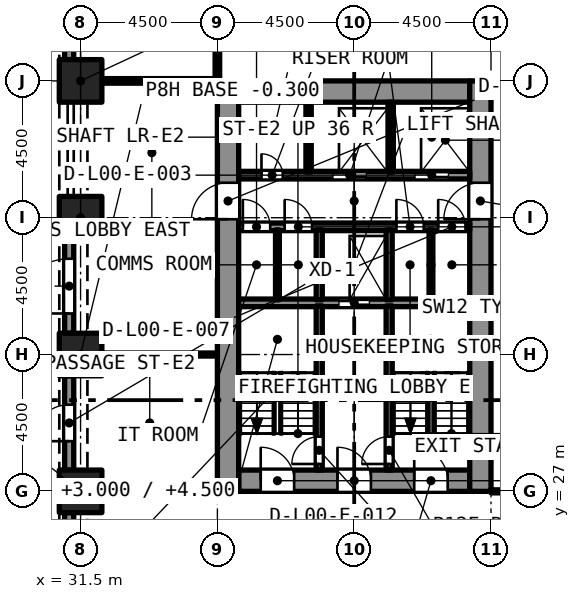
"""IFC4 building model, lengths in metres.
Left out: names, types, materials, properties, quantities, classifications, styles, units other than length and angle.
Written with IfcOpenShell. Run it as: python <this file> out.ifc"""

import sys

from ifc_helpers import new_model, si_unit, direction, frame, frame_2d, origin, origin_2d, place, context, subcontext, project, spatial, rectangle, extrude, element, fill, save


model = new_model("IFC4")
c1 = context("Model", 3, precision=1e-05, world=origin(), true_north=direction((0.0, 1.0)))
c2 = subcontext(c1, "Body", "Model", "MODEL_VIEW")
j1 = project(units=[si_unit("LENGTHUNIT", "METRE"), si_unit("PLANEANGLEUNIT", "RADIAN")], contexts=[c1])
p1 = place(None, origin())
s1 = spatial("IfcSite", under=j1, at=p1, CompositionType="ELEMENT")
p2 = place(p1, origin())
s2 = spatial("IfcBuilding", under=s1, at=p2, CompositionType="ELEMENT")
p3 = place(p2, origin())
s3 = spatial("IfcBuildingStorey", under=s2, at=p3, CompositionType="ELEMENT", Elevation=0.0)
for number, where, z_axis, x_axis in (
    (1, (31.5, 27.0, -0.3), (0.0, 0.0, 1.0), (1.0, 0.0, 0.0)),
    (2, (31.5, 31.5, -0.3), (0.0, 0.0, 1.0), (1.0, 0.0, 0.0)),
    (3, (31.5, 36.0, -0.3), (0.0, 0.0, 1.0), (1.0, 0.0, 0.0)),
    (4, (31.5, 40.5, -0.3), (0.0, 0.0, 1.0), (1.0, 0.0, 0.0)),
):
    element("IfcColumn", number, at=place(p3, frame(where, z_axis=z_axis, x_axis=x_axis)), inside=s3, PredefinedType="COLUMN", context=c2, shape_type="SweptSolid", body=[
        extrude(rectangle(XDim=1.4, YDim=1.4, at=origin_2d()), origin(), (0.0, 0.0, 1.0), 6.3),
    ])
p4 = place(p3, frame((36.7, 27.35, -0.3), z_axis=(0.0, 0.0, 1.0), x_axis=(1.0, 0.0, 0.0)))
e5 = element("IfcWall", 5, at=p4, inside=s3, PredefinedType="SOLIDWALL", context=c2, shape_type="SweptSolid", body=[
    extrude(rectangle(XDim=7.6, YDim=0.7, at=frame_2d((3.8, 0.0))), origin(), (0.0, 0.0, 1.0), 6.3),
])
p5 = place(p4, frame((5.775, 0.0, 0.3)))
e6 = element("IfcOpeningElement", 6, at=p5, cuts=e5, PredefinedType="OPENING", context=c2, shape_type="SweptSolid", body=[
    extrude(rectangle(XDim=1.1, YDim=2.1, at=frame_2d((0.55, 1.05))), frame((0.0, 0.36, 0.0), z_axis=(0.0, -1.0, 0.0), x_axis=(1.0, 0.0, 0.0)), (0.0, 0.0, 1.0), 0.72),
])
p6 = place(p4, frame((3.25, 0.0, 0.3)))
e7 = element("IfcOpeningElement", 7, at=p6, cuts=e5, PredefinedType="OPENING", context=c2, shape_type="SweptSolid", body=[
    extrude(rectangle(XDim=1.1, YDim=2.1, at=frame_2d((0.55, 1.05))), frame((0.0, 0.36, 0.0), z_axis=(0.0, -1.0, 0.0), x_axis=(1.0, 0.0, 0.0)), (0.0, 0.0, 1.0), 0.72),
])
p7 = place(p4, frame((0.725, 0.0, 0.3)))
e8 = element("IfcOpeningElement", 8, at=p7, cuts=e5, PredefinedType="OPENING", context=c2, shape_type="SweptSolid", body=[
    extrude(rectangle(XDim=1.1, YDim=2.1, at=frame_2d((0.55, 1.05))), frame((0.0, 0.36, 0.0), z_axis=(0.0, -1.0, 0.0), x_axis=(1.0, 0.0, 0.0)), (0.0, 0.0, 1.0), 0.72),
])
p8 = place(p3, frame((36.7, 40.15, -0.3), z_axis=(0.0, 0.0, 1.0), x_axis=(1.0, 0.0, 0.0)))
e9 = element("IfcWall", 9, at=p8, inside=s3, PredefinedType="SOLIDWALL", context=c2, shape_type="SweptSolid", body=[
    extrude(rectangle(XDim=7.6, YDim=0.7, at=frame_2d((3.8, 0.0))), origin(), (0.0, 0.0, 1.0), 6.3),
])
p9 = place(p3, frame((36.35, 27.0, -0.3), z_axis=(0.0, 0.0, 1.0), x_axis=(0.0, 1.0, 0.0)))
e10 = element("IfcWall", 10, at=p9, inside=s3, PredefinedType="SOLIDWALL", context=c2, shape_type="SweptSolid", body=[
    extrude(rectangle(XDim=13.5, YDim=0.7, at=frame_2d((6.75, 0.0))), origin(), (0.0, 0.0, 1.0), 6.3),
])
p10 = place(p9, frame((8.95, 0.0, 0.3)))
e11 = element("IfcOpeningElement", 11, at=p10, cuts=e10, PredefinedType="OPENING", context=c2, shape_type="SweptSolid", body=[
    extrude(rectangle(XDim=1.2, YDim=2.1, at=frame_2d((0.6, 1.05))), frame((0.0, 0.36, 0.0), z_axis=(0.0, -1.0, 0.0), x_axis=(1.0, 0.0, 0.0)), (0.0, 0.0, 1.0), 0.72),
])
p11 = place(p3, frame((44.65, 27.0, -0.3), z_axis=(0.0, 0.0, 1.0), x_axis=(0.0, 1.0, 0.0)))
e12 = element("IfcWall", 12, at=p11, inside=s3, PredefinedType="SOLIDWALL", context=c2, shape_type="SweptSolid", body=[
    extrude(rectangle(XDim=13.5, YDim=0.7, at=frame_2d((6.75, 0.0))), origin(), (0.0, 0.0, 1.0), 6.3),
])
p12 = place(p11, frame((8.95, 0.0, 0.3)))
e13 = element("IfcOpeningElement", 13, at=p12, cuts=e12, PredefinedType="OPENING", context=c2, shape_type="SweptSolid", body=[
    extrude(rectangle(XDim=1.2, YDim=2.1, at=frame_2d((0.6, 1.05))), frame((0.0, 0.36, 0.0), z_axis=(0.0, -1.0, 0.0), x_axis=(1.0, 0.0, 0.0)), (0.0, 0.0, 1.0), 0.72),
])
p13 = place(p3, frame((31.125, 41.2, 0.0), z_axis=(0.0, 0.0, 1.0), x_axis=(0.0, 1.0, 0.0)))
e14 = element("IfcWall", 14, at=p13, inside=s3, PredefinedType="SOLIDWALL", context=c2, shape_type="SweptSolid", body=[
    extrude(rectangle(XDim=3.1, YDim=0.3, at=frame_2d((1.55, 0.0))), origin(), (0.0, 0.0, 1.0), 6.0),
])
p14 = place(p13, frame((0.65, 0.0, 0.0)))
e15 = element("IfcOpeningElement", 15, at=p14, cuts=e14, PredefinedType="OPENING", context=c2, shape_type="SweptSolid", body=[
    extrude(rectangle(XDim=1.8, YDim=2.4, at=frame_2d((0.9, 1.2))), frame((0.0, 0.16, 0.0), z_axis=(0.0, -1.0, 0.0), x_axis=(1.0, 0.0, 0.0)), (0.0, 0.0, 1.0), 0.32),
])
p15 = place(p3, frame((31.125, 32.2, 0.0), z_axis=(0.0, 0.0, 1.0), x_axis=(0.0, 1.0, 0.0)))
e16 = element("IfcWall", 16, at=p15, inside=s3, PredefinedType="SOLIDWALL", context=c2, shape_type="SweptSolid", body=[
    extrude(rectangle(XDim=3.1, YDim=0.3, at=frame_2d((1.55, 0.0))), origin(), (0.0, 0.0, 1.0), 6.0),
])
p16 = place(p15, frame((0.65, 0.0, 0.0)))
e17 = element("IfcOpeningElement", 17, at=p16, cuts=e16, PredefinedType="OPENING", context=c2, shape_type="SweptSolid", body=[
    extrude(rectangle(XDim=1.8, YDim=2.4, at=frame_2d((0.9, 1.2))), frame((0.0, 0.16, 0.0), z_axis=(0.0, -1.0, 0.0), x_axis=(1.0, 0.0, 0.0)), (0.0, 0.0, 1.0), 0.32),
])
p17 = place(p3, frame((31.125, 27.7, 0.0), z_axis=(0.0, 0.0, 1.0), x_axis=(0.0, 1.0, 0.0)))
e18 = element("IfcWall", 18, at=p17, inside=s3, PredefinedType="SOLIDWALL", context=c2, shape_type="SweptSolid", body=[
    extrude(rectangle(XDim=3.1, YDim=0.3, at=frame_2d((1.55, 0.0))), origin(), (0.0, 0.0, 1.0), 6.0),
])
p18 = place(p17, frame((0.95, 0.0, 0.0)))
e19 = element("IfcOpeningElement", 19, at=p18, cuts=e18, PredefinedType="OPENING", context=c2, shape_type="SweptSolid", body=[
    extrude(rectangle(XDim=1.2, YDim=2.4, at=frame_2d((0.6, 1.2))), frame((0.0, 0.16, 0.0), z_axis=(0.0, -1.0, 0.0), x_axis=(1.0, 0.0, 0.0)), (0.0, 0.0, 1.0), 0.32),
])
p19 = place(p3, frame((31.125, 23.2, 0.0), z_axis=(0.0, 0.0, 1.0), x_axis=(0.0, 1.0, 0.0)))
e20 = element("IfcWall", 20, at=p19, inside=s3, PredefinedType="SOLIDWALL", context=c2, shape_type="SweptSolid", body=[
    extrude(rectangle(XDim=3.1, YDim=0.3, at=frame_2d((1.55, 0.0))), origin(), (0.0, 0.0, 1.0), 6.0),
])
p20 = place(p19, frame((0.95, 0.0, 0.0)))
e21 = element("IfcOpeningElement", 21, at=p20, cuts=e20, PredefinedType="OPENING", context=c2, shape_type="SweptSolid", body=[
    extrude(rectangle(XDim=1.2, YDim=2.4, at=frame_2d((0.6, 1.2))), frame((0.0, 0.16, 0.0), z_axis=(0.0, -1.0, 0.0), x_axis=(1.0, 0.0, 0.0)), (0.0, 0.0, 1.0), 0.32),
])
p21 = place(p3, frame((36.7, 33.2, 0.0), z_axis=(0.0, 0.0, 1.0), x_axis=(1.0, 0.0, 0.0)))
e22 = element("IfcWall", 22, at=p21, inside=s3, PredefinedType="SOLIDWALL", context=c2, shape_type="SweptSolid", body=[
    extrude(rectangle(XDim=7.6, YDim=0.25, at=frame_2d((3.8, 0.0))), origin(), (0.0, 0.0, 1.0), 5.65),
])
p22 = place(p21, frame((3.3, 0.0, 0.0)))
e23 = element("IfcOpeningElement", 23, at=p22, cuts=e22, PredefinedType="OPENING", context=c2, shape_type="SweptSolid", body=[
    extrude(rectangle(XDim=1.0, YDim=2.1, at=frame_2d((0.5, 1.05))), frame((0.0, 0.135, 0.0), z_axis=(0.0, -1.0, 0.0), x_axis=(1.0, 0.0, 0.0)), (0.0, 0.0, 1.0), 0.27),
])
p23 = place(p3, frame((36.7, 35.7, 0.0), z_axis=(0.0, 0.0, 1.0), x_axis=(1.0, 0.0, 0.0)))
e24 = element("IfcWall", 24, at=p23, inside=s3, PredefinedType="SOLIDWALL", context=c2, shape_type="SweptSolid", body=[
    extrude(rectangle(XDim=7.6, YDim=0.25, at=frame_2d((3.8, 0.0))), origin(), (0.0, 0.0, 1.0), 5.65),
])
p24 = place(p23, frame((6.562, 0.0, 0.0)))
e25 = element("IfcOpeningElement", 25, at=p24, cuts=e24, PredefinedType="OPENING", context=c2, shape_type="SweptSolid", body=[
    extrude(rectangle(XDim=0.9, YDim=2.1, at=frame_2d((0.45, 1.05))), frame((0.0, 0.135, 0.0), z_axis=(0.0, -1.0, 0.0), x_axis=(1.0, 0.0, 0.0)), (0.0, 0.0, 1.0), 0.27),
])
p25 = place(p23, frame((5.188, 0.0, 0.0)))
e26 = element("IfcOpeningElement", 26, at=p25, cuts=e24, PredefinedType="OPENING", context=c2, shape_type="SweptSolid", body=[
    extrude(rectangle(XDim=0.9, YDim=2.1, at=frame_2d((0.45, 1.05))), frame((0.0, 0.135, 0.0), z_axis=(0.0, -1.0, 0.0), x_axis=(1.0, 0.0, 0.0)), (0.0, 0.0, 1.0), 0.27),
])
p26 = place(p23, frame((1.512, 0.0, 0.0)))
e27 = element("IfcOpeningElement", 27, at=p26, cuts=e24, PredefinedType="OPENING", context=c2, shape_type="SweptSolid", body=[
    extrude(rectangle(XDim=0.9, YDim=2.1, at=frame_2d((0.45, 1.05))), frame((0.0, 0.135, 0.0), z_axis=(0.0, -1.0, 0.0), x_axis=(1.0, 0.0, 0.0)), (0.0, 0.0, 1.0), 0.27),
])
p27 = place(p23, frame((0.137, 0.0, 0.0)))
e28 = element("IfcOpeningElement", 28, at=p27, cuts=e24, PredefinedType="OPENING", context=c2, shape_type="SweptSolid", body=[
    extrude(rectangle(XDim=0.9, YDim=2.1, at=frame_2d((0.45, 1.05))), frame((0.0, 0.135, 0.0), z_axis=(0.0, -1.0, 0.0), x_axis=(1.0, 0.0, 0.0)), (0.0, 0.0, 1.0), 0.27),
])
p28 = place(p3, frame((36.7, 37.4, 0.0), z_axis=(0.0, 0.0, 1.0), x_axis=(1.0, 0.0, 0.0)))
e29 = element("IfcWall", 29, at=p28, inside=s3, PredefinedType="SOLIDWALL", context=c2, shape_type="SweptSolid", body=[
    extrude(rectangle(XDim=7.6, YDim=0.25, at=frame_2d((3.8, 0.0))), origin(), (0.0, 0.0, 1.0), 5.65),
])
p29 = place(p28, frame((5.8, 0.0, 0.0)))
e30 = element("IfcOpeningElement", 30, at=p29, cuts=e29, PredefinedType="OPENING", context=c2, shape_type="SweptSolid", body=[
    extrude(rectangle(XDim=1.1, YDim=2.4, at=frame_2d((0.55, 1.2))), frame((0.0, 0.135, 0.0), z_axis=(0.0, -1.0, 0.0), x_axis=(1.0, 0.0, 0.0)), (0.0, 0.0, 1.0), 0.27),
])
p30 = place(p28, frame((3.1, 0.0, 0.0)))
e31 = element("IfcOpeningElement", 31, at=p30, cuts=e29, PredefinedType="OPENING", context=c2, shape_type="SweptSolid", body=[
    extrude(rectangle(XDim=1.1, YDim=2.4, at=frame_2d((0.55, 1.2))), frame((0.0, 0.135, 0.0), z_axis=(0.0, -1.0, 0.0), x_axis=(1.0, 0.0, 0.0)), (0.0, 0.0, 1.0), 0.27),
])
p31 = place(p28, frame((0.75, 0.0, 0.0)))
e32 = element("IfcOpeningElement", 32, at=p31, cuts=e29, PredefinedType="OPENING", context=c2, shape_type="SweptSolid", body=[
    extrude(rectangle(XDim=0.7, YDim=2.1, at=frame_2d((0.35, 1.05))), frame((0.0, 0.135, 0.0), z_axis=(0.0, -1.0, 0.0), x_axis=(1.0, 0.0, 0.0)), (0.0, 0.0, 1.0), 0.27),
])
p32 = place(p3, frame((41.65, 27.7, 0.0), z_axis=(0.0, 0.0, 1.0), x_axis=(0.0, 1.0, 0.0)))
e33 = element("IfcWall", 33, at=p32, inside=s3, PredefinedType="SOLIDWALL", context=c2, shape_type="SweptSolid", body=[
    extrude(rectangle(XDim=5.4, YDim=0.2, at=frame_2d((2.7, 0.0))), origin(), (0.0, 0.0, 1.0), 5.65),
])
p33 = place(p32, frame((0.2, 0.0, 0.0)))
e34 = element("IfcOpeningElement", 34, at=p33, cuts=e33, PredefinedType="OPENING", context=c2, shape_type="SweptSolid", body=[
    extrude(rectangle(XDim=0.9, YDim=2.1, at=frame_2d((0.45, 1.05))), frame((0.0, 0.11, 0.0), z_axis=(0.0, -1.0, 0.0), x_axis=(1.0, 0.0, 0.0)), (0.0, 0.0, 1.0), 0.22),
])
p34 = place(p3, frame((39.35, 27.7, 0.0), z_axis=(0.0, 0.0, 1.0), x_axis=(0.0, 1.0, 0.0)))
e35 = element("IfcWall", 35, at=p34, inside=s3, PredefinedType="SOLIDWALL", context=c2, shape_type="SweptSolid", body=[
    extrude(rectangle(XDim=5.4, YDim=0.2, at=frame_2d((2.7, 0.0))), origin(), (0.0, 0.0, 1.0), 5.65),
])
p35 = place(p34, frame((0.2, 0.0, 0.0)))
e36 = element("IfcOpeningElement", 36, at=p35, cuts=e35, PredefinedType="OPENING", context=c2, shape_type="SweptSolid", body=[
    extrude(rectangle(XDim=0.9, YDim=2.1, at=frame_2d((0.45, 1.05))), frame((0.0, 0.11, 0.0), z_axis=(0.0, -1.0, 0.0), x_axis=(1.0, 0.0, 0.0)), (0.0, 0.0, 1.0), 0.22),
])
for number, where, z_axis, x_axis in (
    (37, (41.65, 33.3, 0.0), (0.0, 0.0, 1.0), (0.0, 1.0, 0.0)),
    (38, (39.35, 33.3, 0.0), (0.0, 0.0, 1.0), (0.0, 1.0, 0.0)),
):
    element("IfcWall", number, at=place(p3, frame(where, z_axis=z_axis, x_axis=x_axis)), inside=s3, PredefinedType="SOLIDWALL", context=c2, shape_type="SweptSolid", body=[
        extrude(rectangle(XDim=2.3, YDim=0.2, at=frame_2d((1.15, 0.0))), origin(), (0.0, 0.0, 1.0), 5.65),
    ])
for number, where, z_axis, x_axis in (
    (39, (41.7, 37.5, 0.0), (0.0, 0.0, 1.0), (0.0, 1.0, 0.0)),
    (40, (39.0, 37.5, 0.0), (0.0, 0.0, 1.0), (0.0, 1.0, 0.0)),
):
    element("IfcWall", number, at=place(p3, frame(where, z_axis=z_axis, x_axis=x_axis)), inside=s3, PredefinedType="SOLIDWALL", context=c2, shape_type="SweptSolid", body=[
        extrude(rectangle(XDim=2.3, YDim=0.175, at=frame_2d((1.15, 0.0))), origin(), (0.0, 0.0, 1.0), 5.65),
    ])
for number, where, z_axis, x_axis in (
    (41, (43.025, 33.3, 0.0), (0.0, 0.0, 1.0), (0.0, 1.0, 0.0)),
    (42, (37.975, 33.3, 0.0), (0.0, 0.0, 1.0), (0.0, 1.0, 0.0)),
):
    element("IfcWall", number, at=place(p3, frame(where, z_axis=z_axis, x_axis=x_axis)), inside=s3, PredefinedType="PARTITIONING", context=c2, shape_type="SweptSolid", body=[
        extrude(rectangle(XDim=2.3, YDim=0.125, at=frame_2d((1.15, 0.0))), origin(), (0.0, 0.0, 1.0), 5.65),
    ])
p36 = place(p3, frame((32.2, 40.5, 0.0), z_axis=(0.0, 0.0, 1.0), x_axis=(1.0, 0.0, 0.0)))
e43 = element("IfcWall", 43, at=p36, inside=s3, PredefinedType="PARTITIONING", context=c2, shape_type="SweptSolid", body=[
    extrude(rectangle(XDim=3.725, YDim=0.15, at=frame_2d((1.863, 0.0))), origin(), (0.0, 0.0, 1.0), 5.65),
])
p37 = place(p3, frame((36.0, 40.425, 0.0), z_axis=(0.0, 0.0, 1.0), x_axis=(0.0, 1.0, 0.0)))
e44 = element("IfcWall", 44, at=p37, inside=s3, PredefinedType="PARTITIONING", context=c2, shape_type="SweptSolid", body=[
    extrude(rectangle(XDim=4.575, YDim=0.15, at=frame_2d((2.288, 0.0))), origin(), (0.0, 0.0, 1.0), 5.65),
])
p38 = place(p37, frame((1.825, 0.0, 0.0)))
e45 = element("IfcOpeningElement", 45, at=p38, cuts=e44, PredefinedType="OPENING", context=c2, shape_type="SweptSolid", body=[
    extrude(rectangle(XDim=1.0, YDim=2.1, at=frame_2d((0.5, 1.05))), frame((0.0, 0.085, 0.0), z_axis=(0.0, -1.0, 0.0), x_axis=(1.0, 0.0, 0.0)), (0.0, 0.0, 1.0), 0.17),
])
for number, where, z_axis, x_axis in (
    (46, (45.0, 27.0, 0.0), (0.0, 0.0, 1.0), (1.0, 0.0, 0.0)),
    (47, (32.2, 31.5, 0.0), (0.0, 0.0, 1.0), (1.0, 0.0, 0.0)),
    (48, (32.2, 27.0, 0.0), (0.0, 0.0, 1.0), (1.0, 0.0, 0.0)),
):
    element("IfcWall", number, at=place(p3, frame(where, z_axis=z_axis, x_axis=x_axis)), inside=s3, PredefinedType="PARTITIONING", context=c2, shape_type="SweptSolid", body=[
        extrude(rectangle(XDim=3.8, YDim=0.1, at=frame_2d((1.9, 0.0))), origin(), (0.0, 0.0, 1.0), 5.65),
    ])
p39 = place(p16, origin())
e49 = element("IfcDoor", 49, at=p39, inside=s3, OperationType="SINGLE_SWING_LEFT", PredefinedType="DOOR", context=c2, shape_type="SweptSolid", body=[
    extrude(rectangle(XDim=1.8, YDim=2.4, at=frame_2d((0.9, 1.2))), frame((0.0, 0.025, 0.0), z_axis=(0.0, -1.0, 0.0), x_axis=(1.0, 0.0, 0.0)), (0.0, 0.0, 1.0), 0.05),
])
fill(e17, e49)
p40 = place(p18, origin())
e50 = element("IfcDoor", 50, at=p40, inside=s3, OperationType="SINGLE_SWING_RIGHT", PredefinedType="DOOR", context=c2, shape_type="SweptSolid", body=[
    extrude(rectangle(XDim=1.2, YDim=2.4, at=frame_2d((0.6, 1.2))), frame((0.0, 0.025, 0.0), z_axis=(0.0, -1.0, 0.0), x_axis=(1.0, 0.0, 0.0)), (0.0, 0.0, 1.0), 0.05),
])
fill(e19, e50)
p41 = place(p33, origin())
e51 = element("IfcDoor", 51, at=p41, inside=s3, OperationType="SINGLE_SWING_LEFT", PredefinedType="DOOR", context=c2, shape_type="SweptSolid", body=[
    extrude(rectangle(XDim=0.9, YDim=2.1, at=frame_2d((0.45, 1.05))), frame((0.0, 0.025, 0.0), z_axis=(0.0, -1.0, 0.0), x_axis=(1.0, 0.0, 0.0)), (0.0, 0.0, 1.0), 0.05),
])
fill(e34, e51)
p42 = place(p35, origin())
e52 = element("IfcDoor", 52, at=p42, inside=s3, OperationType="SINGLE_SWING_LEFT", PredefinedType="DOOR", context=c2, shape_type="SweptSolid", body=[
    extrude(rectangle(XDim=0.9, YDim=2.1, at=frame_2d((0.45, 1.05))), frame((0.0, 0.025, 0.0), z_axis=(0.0, -1.0, 0.0), x_axis=(1.0, 0.0, 0.0)), (0.0, 0.0, 1.0), 0.05),
])
fill(e36, e52)
p43 = place(p29, origin())
e53 = element("IfcDoor", 53, at=p43, inside=s3, OperationType="SLIDING_TO_LEFT", PredefinedType="DOOR", context=c2, shape_type="SweptSolid", body=[
    extrude(rectangle(XDim=1.1, YDim=2.4, at=frame_2d((0.55, 1.2))), frame((0.0, 0.025, 0.0), z_axis=(0.0, -1.0, 0.0), x_axis=(1.0, 0.0, 0.0)), (0.0, 0.0, 1.0), 0.05),
])
fill(e30, e53)
p44 = place(p30, origin())
e54 = element("IfcDoor", 54, at=p44, inside=s3, OperationType="SLIDING_TO_LEFT", PredefinedType="DOOR", context=c2, shape_type="SweptSolid", body=[
    extrude(rectangle(XDim=1.1, YDim=2.4, at=frame_2d((0.55, 1.2))), frame((0.0, 0.025, 0.0), z_axis=(0.0, -1.0, 0.0), x_axis=(1.0, 0.0, 0.0)), (0.0, 0.0, 1.0), 0.05),
])
fill(e31, e54)
p45 = place(p22, origin())
e55 = element("IfcDoor", 55, at=p45, inside=s3, OperationType="SLIDING_TO_LEFT", PredefinedType="DOOR", context=c2, shape_type="SweptSolid", body=[
    extrude(rectangle(XDim=1.0, YDim=2.1, at=frame_2d((0.5, 1.05))), frame((0.0, 0.025, 0.0), z_axis=(0.0, -1.0, 0.0), x_axis=(1.0, 0.0, 0.0)), (0.0, 0.0, 1.0), 0.05),
])
fill(e23, e55)
p46 = place(p31, origin())
e56 = element("IfcDoor", 56, at=p46, inside=s3, OperationType="SINGLE_SWING_LEFT", PredefinedType="DOOR", context=c2, shape_type="SweptSolid", body=[
    extrude(rectangle(XDim=0.7, YDim=2.1, at=frame_2d((0.35, 1.05))), frame((0.0, 0.025, 0.0), z_axis=(0.0, -1.0, 0.0), x_axis=(1.0, 0.0, 0.0)), (0.0, 0.0, 1.0), 0.05),
])
fill(e32, e56)
p47 = place(p24, origin())
e57 = element("IfcDoor", 57, at=p47, inside=s3, OperationType="SINGLE_SWING_LEFT", PredefinedType="DOOR", context=c2, shape_type="SweptSolid", body=[
    extrude(rectangle(XDim=0.9, YDim=2.1, at=frame_2d((0.45, 1.05))), frame((0.0, 0.025, 0.0), z_axis=(0.0, -1.0, 0.0), x_axis=(1.0, 0.0, 0.0)), (0.0, 0.0, 1.0), 0.05),
])
fill(e25, e57)
p48 = place(p25, origin())
e58 = element("IfcDoor", 58, at=p48, inside=s3, OperationType="SINGLE_SWING_LEFT", PredefinedType="DOOR", context=c2, shape_type="SweptSolid", body=[
    extrude(rectangle(XDim=0.9, YDim=2.1, at=frame_2d((0.45, 1.05))), frame((0.0, 0.025, 0.0), z_axis=(0.0, -1.0, 0.0), x_axis=(1.0, 0.0, 0.0)), (0.0, 0.0, 1.0), 0.05),
])
fill(e26, e58)
p49 = place(p26, origin())
e59 = element("IfcDoor", 59, at=p49, inside=s3, OperationType="SINGLE_SWING_LEFT", PredefinedType="DOOR", context=c2, shape_type="SweptSolid", body=[
    extrude(rectangle(XDim=0.9, YDim=2.1, at=frame_2d((0.45, 1.05))), frame((0.0, 0.025, 0.0), z_axis=(0.0, -1.0, 0.0), x_axis=(1.0, 0.0, 0.0)), (0.0, 0.0, 1.0), 0.05),
])
fill(e27, e59)
p50 = place(p27, origin())
e60 = element("IfcDoor", 60, at=p50, inside=s3, OperationType="SINGLE_SWING_LEFT", PredefinedType="DOOR", context=c2, shape_type="SweptSolid", body=[
    extrude(rectangle(XDim=0.9, YDim=2.1, at=frame_2d((0.45, 1.05))), frame((0.0, 0.025, 0.0), z_axis=(0.0, -1.0, 0.0), x_axis=(1.0, 0.0, 0.0)), (0.0, 0.0, 1.0), 0.05),
])
fill(e28, e60)
p51 = place(p5, origin())
e61 = element("IfcDoor", 61, at=p51, inside=s3, OperationType="SINGLE_SWING_LEFT", PredefinedType="DOOR", context=c2, shape_type="SweptSolid", body=[
    extrude(rectangle(XDim=1.1, YDim=2.1, at=frame_2d((0.55, 1.05))), frame((0.0, 0.025, 0.0), z_axis=(0.0, -1.0, 0.0), x_axis=(1.0, 0.0, 0.0)), (0.0, 0.0, 1.0), 0.05),
])
fill(e6, e61)
p52 = place(p6, origin())
e62 = element("IfcDoor", 62, at=p52, inside=s3, OperationType="SINGLE_SWING_LEFT", PredefinedType="DOOR", context=c2, shape_type="SweptSolid", body=[
    extrude(rectangle(XDim=1.1, YDim=2.1, at=frame_2d((0.55, 1.05))), frame((0.0, 0.025, 0.0), z_axis=(0.0, -1.0, 0.0), x_axis=(1.0, 0.0, 0.0)), (0.0, 0.0, 1.0), 0.05),
])
fill(e7, e62)
p53 = place(p7, origin())
e63 = element("IfcDoor", 63, at=p53, inside=s3, OperationType="SINGLE_SWING_LEFT", PredefinedType="DOOR", context=c2, shape_type="SweptSolid", body=[
    extrude(rectangle(XDim=1.1, YDim=2.1, at=frame_2d((0.55, 1.05))), frame((0.0, 0.025, 0.0), z_axis=(0.0, -1.0, 0.0), x_axis=(1.0, 0.0, 0.0)), (0.0, 0.0, 1.0), 0.05),
])
fill(e8, e63)
p54 = place(p10, origin())
e64 = element("IfcDoor", 64, at=p54, inside=s3, OperationType="SINGLE_SWING_LEFT", PredefinedType="DOOR", context=c2, shape_type="SweptSolid", body=[
    extrude(rectangle(XDim=1.2, YDim=2.1, at=frame_2d((0.6, 1.05))), frame((0.0, 0.025, 0.0), z_axis=(0.0, -1.0, 0.0), x_axis=(1.0, 0.0, 0.0)), (0.0, 0.0, 1.0), 0.05),
])
fill(e11, e64)
p55 = place(p12, origin())
e65 = element("IfcDoor", 65, at=p55, inside=s3, OperationType="SINGLE_SWING_LEFT", PredefinedType="DOOR", context=c2, shape_type="SweptSolid", body=[
    extrude(rectangle(XDim=1.2, YDim=2.1, at=frame_2d((0.6, 1.05))), frame((0.0, 0.025, 0.0), z_axis=(0.0, -1.0, 0.0), x_axis=(1.0, 0.0, 0.0)), (0.0, 0.0, 1.0), 0.05),
])
fill(e13, e65)
save(model, sys.argv[1])
